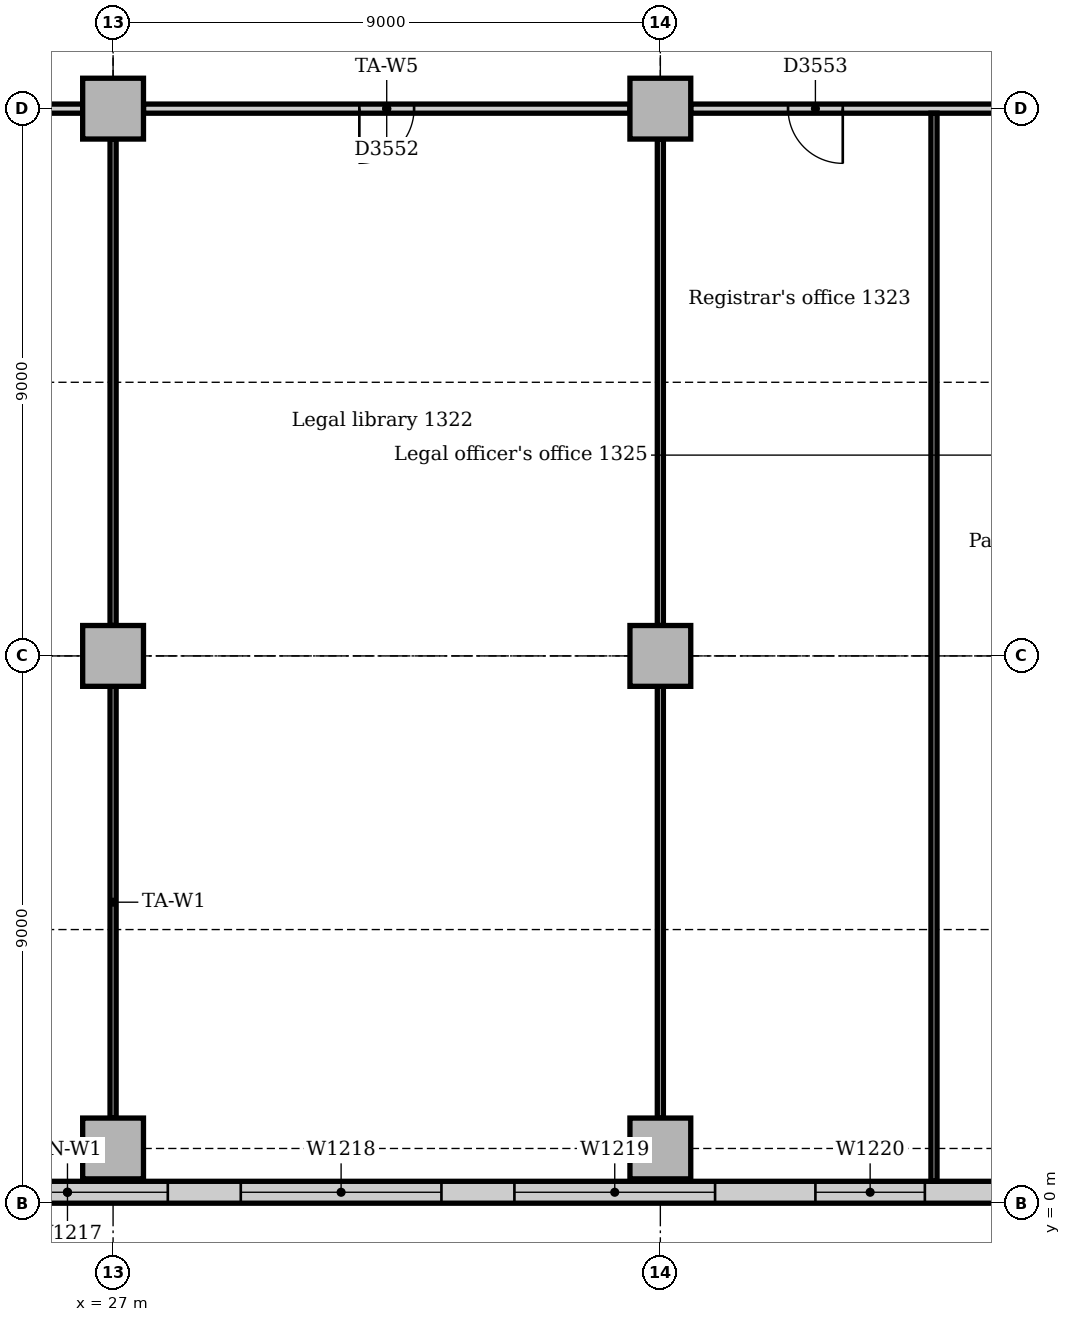
"""IFC4 building model, lengths in metres.
Left out: names, types, materials, properties, quantities, classifications, styles, units other than length and angle.
Written with IfcOpenShell. Run it as: python <this file> out.ifc"""

import sys

from ifc_helpers import new_model, si_unit, direction, frame, frame_2d, origin, origin_2d, place, context, subcontext, project, spatial, rectangle, extrude, element, fill, save


model = new_model("IFC4")
c1 = context("Model", 3, precision=1e-05, world=origin(), true_north=direction((0.0, 1.0)))
c2 = subcontext(c1, "Body", "Model", "MODEL_VIEW")
j1 = project(units=[si_unit("LENGTHUNIT", "METRE"), si_unit("PLANEANGLEUNIT", "RADIAN")], contexts=[c1])
p1 = place(None, origin())
s1 = spatial("IfcSite", under=j1, at=p1, CompositionType="ELEMENT")
p2 = place(p1, origin())
s2 = spatial("IfcBuilding", under=s1, at=p2, CompositionType="ELEMENT")
p3 = place(p2, frame((0.0, 0.0, 59.0)))
s3 = spatial("IfcBuildingStorey", under=s2, at=p3, CompositionType="ELEMENT", Elevation=59.0)
for number, where, z_axis, x_axis in (
    (1, (27.0, 0.9, 0.0), (0.0, 0.0, 1.0), (1.0, 0.0, 0.0)),
    (2, (36.0, 0.9, 0.0), (0.0, 0.0, 1.0), (1.0, 0.0, 0.0)),
    (3, (27.0, 9.0, 0.0), (0.0, 0.0, 1.0), (1.0, 0.0, 0.0)),
    (4, (27.0, 18.0, 0.0), (0.0, 0.0, 1.0), (1.0, 0.0, 0.0)),
    (5, (36.0, 9.0, 0.0), (0.0, 0.0, 1.0), (1.0, 0.0, 0.0)),
    (6, (36.0, 18.0, 0.0), (0.0, 0.0, 1.0), (1.0, 0.0, 0.0)),
):
    element("IfcColumn", number, at=place(p3, frame(where, z_axis=z_axis, x_axis=x_axis)), inside=s3, PredefinedType="COLUMN", context=c2, shape_type="SweptSolid", body=[
        extrude(rectangle(XDim=1.0, YDim=1.0, at=origin_2d()), origin(), (0.0, 0.0, 1.0), 3.85),
    ])
p4 = place(p3, frame((4.243, 0.18, 0.0), z_axis=(0.0, 0.0, 1.0), x_axis=(1.0, 0.0, 0.0)))
e7 = element("IfcWall", 7, at=p4, inside=s3, PredefinedType="STANDARD", context=c2, shape_type="SweptSolid", body=[
    extrude(rectangle(XDim=44.015, YDim=0.36, at=frame_2d((22.007, 0.0))), origin(), (0.0, 0.0, 1.0), 3.85),
])
p5 = place(p4, frame((2.357, 0.0, 0.9)))
e8 = element("IfcOpeningElement", 8, at=p5, cuts=e7, PredefinedType="OPENING", context=c2, shape_type="SweptSolid", body=[
    extrude(rectangle(XDim=3.3, YDim=1.6, at=frame_2d((1.65, 0.8))), frame((0.0, 0.19, 0.0), z_axis=(0.0, -1.0, 0.0), x_axis=(1.0, 0.0, 0.0)), (0.0, 0.0, 1.0), 0.38),
])
p6 = place(p4, frame((7.307, 0.0, 0.9)))
e9 = element("IfcOpeningElement", 9, at=p6, cuts=e7, PredefinedType="OPENING", context=c2, shape_type="SweptSolid", body=[
    extrude(rectangle(XDim=1.8, YDim=1.6, at=frame_2d((0.9, 0.8))), frame((0.0, 0.19, 0.0), z_axis=(0.0, -1.0, 0.0), x_axis=(1.0, 0.0, 0.0)), (0.0, 0.0, 1.0), 0.38),
])
p7 = place(p4, frame((11.357, 0.0, 0.9)))
e10 = element("IfcOpeningElement", 10, at=p7, cuts=e7, PredefinedType="OPENING", context=c2, shape_type="SweptSolid", body=[
    extrude(rectangle(XDim=3.3, YDim=1.6, at=frame_2d((1.65, 0.8))), frame((0.0, 0.19, 0.0), z_axis=(0.0, -1.0, 0.0), x_axis=(1.0, 0.0, 0.0)), (0.0, 0.0, 1.0), 0.38),
])
p8 = place(p4, frame((15.857, 0.0, 0.9)))
e11 = element("IfcOpeningElement", 11, at=p8, cuts=e7, PredefinedType="OPENING", context=c2, shape_type="SweptSolid", body=[
    extrude(rectangle(XDim=3.3, YDim=1.6, at=frame_2d((1.65, 0.8))), frame((0.0, 0.19, 0.0), z_axis=(0.0, -1.0, 0.0), x_axis=(1.0, 0.0, 0.0)), (0.0, 0.0, 1.0), 0.38),
])
p9 = place(p4, frame((20.357, 0.0, 0.9)))
e12 = element("IfcOpeningElement", 12, at=p9, cuts=e7, PredefinedType="OPENING", context=c2, shape_type="SweptSolid", body=[
    extrude(rectangle(XDim=3.3, YDim=1.6, at=frame_2d((1.65, 0.8))), frame((0.0, 0.19, 0.0), z_axis=(0.0, -1.0, 0.0), x_axis=(1.0, 0.0, 0.0)), (0.0, 0.0, 1.0), 0.38),
])
p10 = place(p4, frame((24.857, 0.0, 0.9)))
e13 = element("IfcOpeningElement", 13, at=p10, cuts=e7, PredefinedType="OPENING", context=c2, shape_type="SweptSolid", body=[
    extrude(rectangle(XDim=3.3, YDim=1.6, at=frame_2d((1.65, 0.8))), frame((0.0, 0.19, 0.0), z_axis=(0.0, -1.0, 0.0), x_axis=(1.0, 0.0, 0.0)), (0.0, 0.0, 1.0), 0.38),
])
p11 = place(p4, frame((29.357, 0.0, 0.9)))
e14 = element("IfcOpeningElement", 14, at=p11, cuts=e7, PredefinedType="OPENING", context=c2, shape_type="SweptSolid", body=[
    extrude(rectangle(XDim=3.3, YDim=1.6, at=frame_2d((1.65, 0.8))), frame((0.0, 0.19, 0.0), z_axis=(0.0, -1.0, 0.0), x_axis=(1.0, 0.0, 0.0)), (0.0, 0.0, 1.0), 0.38),
])
p12 = place(p4, frame((34.307, 0.0, 0.9)))
e15 = element("IfcOpeningElement", 15, at=p12, cuts=e7, PredefinedType="OPENING", context=c2, shape_type="SweptSolid", body=[
    extrude(rectangle(XDim=1.8, YDim=1.6, at=frame_2d((0.9, 0.8))), frame((0.0, 0.19, 0.0), z_axis=(0.0, -1.0, 0.0), x_axis=(1.0, 0.0, 0.0)), (0.0, 0.0, 1.0), 0.38),
])
p13 = place(p4, frame((38.357, 0.0, 0.9)))
e16 = element("IfcOpeningElement", 16, at=p13, cuts=e7, PredefinedType="OPENING", context=c2, shape_type="SweptSolid", body=[
    extrude(rectangle(XDim=3.3, YDim=1.6, at=frame_2d((1.65, 0.8))), frame((0.0, 0.19, 0.0), z_axis=(0.0, -1.0, 0.0), x_axis=(1.0, 0.0, 0.0)), (0.0, 0.0, 1.0), 0.38),
])
p14 = place(p3, frame((36.5, 18.0, 0.0), z_axis=(0.0, 0.0, 1.0), x_axis=(1.0, 0.0, 0.0)))
e17 = element("IfcWall", 17, at=p14, inside=s3, PredefinedType="PARTITIONING", context=c2, shape_type="SweptSolid", body=[
    extrude(rectangle(XDim=8.0, YDim=0.15, at=frame_2d((4.0, 0.0))), origin(), (0.0, 0.0, 1.0), 3.15),
])
p15 = place(p14, frame((1.6, 0.0, 0.0)))
e18 = element("IfcOpeningElement", 18, at=p15, cuts=e17, PredefinedType="OPENING", context=c2, shape_type="SweptSolid", body=[
    extrude(rectangle(XDim=0.9, YDim=2.1, at=frame_2d((0.45, 1.05))), frame((0.0, 0.085, 0.0), z_axis=(0.0, -1.0, 0.0), x_axis=(1.0, 0.0, 0.0)), (0.0, 0.0, 1.0), 0.17),
])
p16 = place(p14, frame((5.45, 0.0, 0.0)))
e19 = element("IfcOpeningElement", 19, at=p16, cuts=e17, PredefinedType="OPENING", context=c2, shape_type="SweptSolid", body=[
    extrude(rectangle(XDim=0.9, YDim=2.1, at=frame_2d((0.45, 1.05))), frame((0.0, 0.085, 0.0), z_axis=(0.0, -1.0, 0.0), x_axis=(1.0, 0.0, 0.0)), (0.0, 0.0, 1.0), 0.17),
])
p17 = place(p3, frame((27.5, 18.0, 0.0), z_axis=(0.0, 0.0, 1.0), x_axis=(1.0, 0.0, 0.0)))
e20 = element("IfcWall", 20, at=p17, inside=s3, PredefinedType="PARTITIONING", context=c2, shape_type="SweptSolid", body=[
    extrude(rectangle(XDim=8.0, YDim=0.15, at=frame_2d((4.0, 0.0))), origin(), (0.0, 0.0, 1.0), 3.15),
])
p18 = place(p17, frame((3.55, 0.0, 0.0)))
e21 = element("IfcOpeningElement", 21, at=p18, cuts=e20, PredefinedType="OPENING", context=c2, shape_type="SweptSolid", body=[
    extrude(rectangle(XDim=0.9, YDim=2.1, at=frame_2d((0.45, 1.05))), frame((0.0, 0.085, 0.0), z_axis=(0.0, -1.0, 0.0), x_axis=(1.0, 0.0, 0.0)), (0.0, 0.0, 1.0), 0.17),
])
p19 = place(p3, frame((18.5, 18.0, 0.0), z_axis=(0.0, 0.0, 1.0), x_axis=(1.0, 0.0, 0.0)))
e22 = element("IfcWall", 22, at=p19, inside=s3, PredefinedType="PARTITIONING", context=c2, shape_type="SweptSolid", body=[
    extrude(rectangle(XDim=8.0, YDim=0.15, at=frame_2d((4.0, 0.0))), origin(), (0.0, 0.0, 1.0), 3.15),
])
p20 = place(p19, frame((3.55, 0.0, 0.0)))
e23 = element("IfcOpeningElement", 23, at=p20, cuts=e22, PredefinedType="OPENING", context=c2, shape_type="SweptSolid", body=[
    extrude(rectangle(XDim=0.9, YDim=2.1, at=frame_2d((0.45, 1.05))), frame((0.0, 0.085, 0.0), z_axis=(0.0, -1.0, 0.0), x_axis=(1.0, 0.0, 0.0)), (0.0, 0.0, 1.0), 0.17),
])
p21 = place(p3, frame((27.0, 1.4, 0.0), z_axis=(0.0, 0.0, 1.0), x_axis=(0.0, 1.0, 0.0)))
e24 = element("IfcWall", 24, at=p21, inside=s3, PredefinedType="PARTITIONING", context=c2, shape_type="SweptSolid", body=[
    extrude(rectangle(XDim=7.1, YDim=0.1, at=frame_2d((3.55, 0.0))), origin(), (0.0, 0.0, 1.0), 3.158),
])
p22 = place(p3, frame((27.0, 9.5, 0.0), z_axis=(0.0, 0.0, 1.0), x_axis=(0.0, 1.0, 0.0)))
e25 = element("IfcWall", 25, at=p22, inside=s3, PredefinedType="PARTITIONING", context=c2, shape_type="SweptSolid", body=[
    extrude(rectangle(XDim=8.0, YDim=0.1, at=frame_2d((4.0, 0.0))), origin(), (0.0, 0.0, 1.0), 3.158),
])
p23 = place(p3, frame((36.0, 1.4, 0.0), z_axis=(0.0, 0.0, 1.0), x_axis=(0.0, 1.0, 0.0)))
e26 = element("IfcWall", 26, at=p23, inside=s3, PredefinedType="PARTITIONING", context=c2, shape_type="SweptSolid", body=[
    extrude(rectangle(XDim=7.1, YDim=0.1, at=frame_2d((3.55, 0.0))), origin(), (0.0, 0.0, 1.0), 3.158),
])
p24 = place(p3, frame((36.0, 9.5, 0.0), z_axis=(0.0, 0.0, 1.0), x_axis=(0.0, 1.0, 0.0)))
e27 = element("IfcWall", 27, at=p24, inside=s3, PredefinedType="PARTITIONING", context=c2, shape_type="SweptSolid", body=[
    extrude(rectangle(XDim=8.0, YDim=0.1, at=frame_2d((4.0, 0.0))), origin(), (0.0, 0.0, 1.0), 3.158),
])
p25 = place(p3, frame((40.5, 0.36, 0.0), z_axis=(0.0, 0.0, 1.0), x_axis=(0.0, 1.0, 0.0)))
e28 = element("IfcWall", 28, at=p25, inside=s3, PredefinedType="PARTITIONING", context=c2, shape_type="SweptSolid", body=[
    extrude(rectangle(XDim=17.565, YDim=0.1, at=frame_2d((8.783, 0.0))), origin(), (0.0, 0.0, 1.0), 3.85),
])
p26 = place(p9, origin())
e29 = element("IfcWindow", 29, at=p26, inside=s3, PartitioningType="SINGLE_PANEL", PredefinedType="WINDOW", context=c2, shape_type="SweptSolid", body=[
    extrude(rectangle(XDim=3.3, YDim=1.6, at=frame_2d((1.65, 0.8))), frame((0.0, 0.13, 0.0), z_axis=(0.0, -1.0, 0.0), x_axis=(1.0, 0.0, 0.0)), (0.0, 0.0, 1.0), 0.06),
])
fill(e12, e29)
p27 = place(p10, origin())
e30 = element("IfcWindow", 30, at=p27, inside=s3, PartitioningType="SINGLE_PANEL", PredefinedType="WINDOW", context=c2, shape_type="SweptSolid", body=[
    extrude(rectangle(XDim=3.3, YDim=1.6, at=frame_2d((1.65, 0.8))), frame((0.0, 0.13, 0.0), z_axis=(0.0, -1.0, 0.0), x_axis=(1.0, 0.0, 0.0)), (0.0, 0.0, 1.0), 0.06),
])
fill(e13, e30)
p28 = place(p11, origin())
e31 = element("IfcWindow", 31, at=p28, inside=s3, PartitioningType="SINGLE_PANEL", PredefinedType="WINDOW", context=c2, shape_type="SweptSolid", body=[
    extrude(rectangle(XDim=3.3, YDim=1.6, at=frame_2d((1.65, 0.8))), frame((0.0, 0.13, 0.0), z_axis=(0.0, -1.0, 0.0), x_axis=(1.0, 0.0, 0.0)), (0.0, 0.0, 1.0), 0.06),
])
fill(e14, e31)
p29 = place(p12, origin())
e32 = element("IfcWindow", 32, at=p29, inside=s3, PartitioningType="SINGLE_PANEL", PredefinedType="WINDOW", context=c2, shape_type="SweptSolid", body=[
    extrude(rectangle(XDim=1.8, YDim=1.6, at=frame_2d((0.9, 0.8))), frame((0.0, 0.13, 0.0), z_axis=(0.0, -1.0, 0.0), x_axis=(1.0, 0.0, 0.0)), (0.0, 0.0, 1.0), 0.06),
])
fill(e15, e32)
p30 = place(p18, frame((0.9, 0.0, 0.0), z_axis=(0.0, 0.0, 1.0), x_axis=(-1.0, 0.0, 0.0)))
e33 = element("IfcDoor", 33, at=p30, inside=s3, OperationType="SINGLE_SWING_RIGHT", PredefinedType="DOOR", context=c2, shape_type="SweptSolid", body=[
    extrude(rectangle(XDim=0.9, YDim=2.1, at=frame_2d((0.45, 1.05))), frame((0.0, 0.025, 0.0), z_axis=(0.0, -1.0, 0.0), x_axis=(1.0, 0.0, 0.0)), (0.0, 0.0, 1.0), 0.05),
])
fill(e21, e33)
p31 = place(p15, frame((0.9, 0.0, 0.0), z_axis=(0.0, 0.0, 1.0), x_axis=(-1.0, 0.0, 0.0)))
e34 = element("IfcDoor", 34, at=p31, inside=s3, OperationType="SINGLE_SWING_LEFT", PredefinedType="DOOR", context=c2, shape_type="SweptSolid", body=[
    extrude(rectangle(XDim=0.9, YDim=2.1, at=frame_2d((0.45, 1.05))), frame((0.0, 0.025, 0.0), z_axis=(0.0, -1.0, 0.0), x_axis=(1.0, 0.0, 0.0)), (0.0, 0.0, 1.0), 0.05),
])
fill(e18, e34)
save(model, sys.argv[1])
